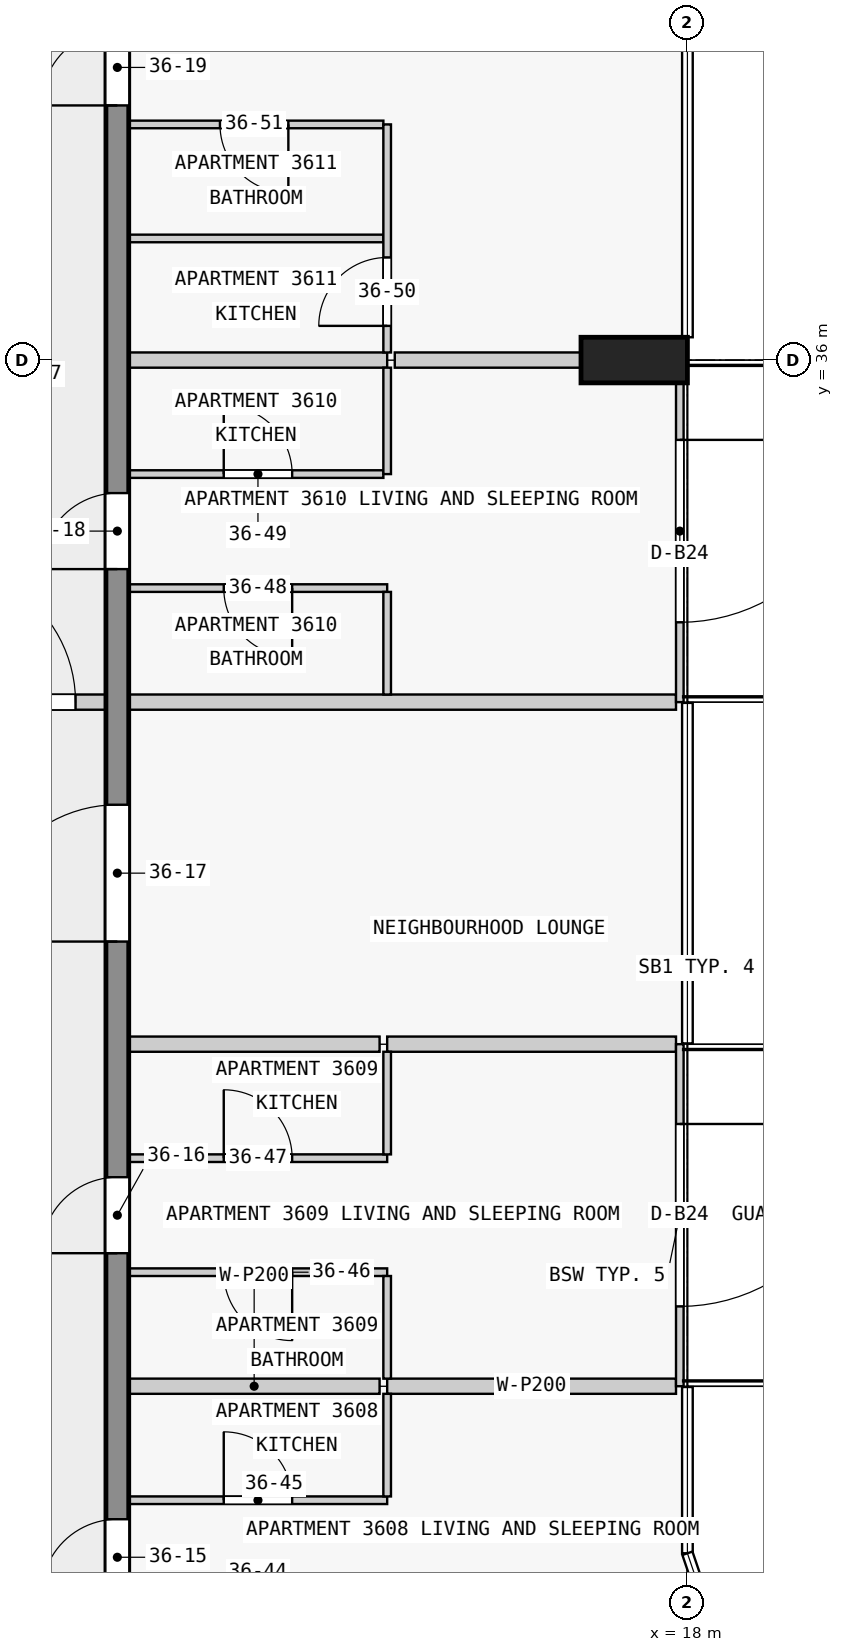
"""IFC4 building model, lengths in metres.
Left out: names, types, materials, properties, quantities, classifications, styles, units other than length and angle.
Written with IfcOpenShell. Run it as: python <this file> out.ifc"""

import sys

from ifc_helpers import new_model, si_unit, direction, frame, frame_2d, origin, origin_2d, place, context, subcontext, project, spatial, rectangle, extrude, element, fill, save


model = new_model("IFC4")
c1 = context("Model", 3, precision=1e-05, world=origin(), true_north=direction((0.0, 1.0)))
c2 = subcontext(c1, "Body", "Model", "MODEL_VIEW")
j1 = project(units=[si_unit("LENGTHUNIT", "METRE"), si_unit("PLANEANGLEUNIT", "RADIAN")], contexts=[c1])
p1 = place(None, origin())
s1 = spatial("IfcSite", under=j1, at=p1, CompositionType="ELEMENT")
p2 = place(p1, origin())
s2 = spatial("IfcBuilding", under=s1, at=p2, CompositionType="ELEMENT")
p3 = place(p2, frame((0.0, 0.0, 142.9)))
s3 = spatial("IfcBuildingStorey", under=s2, at=p3, CompositionType="ELEMENT", Elevation=142.9)
p4 = place(p3, frame((17.3, 36.0, 0.0), z_axis=(0.0, 0.0, 1.0), x_axis=(0.0, 1.0, 0.0)))
e1 = element("IfcColumn", 1, at=p4, inside=s3, PredefinedType="COLUMN", context=c2, shape_type="SweptSolid", body=[
    extrude(rectangle(XDim=0.6, YDim=1.4, at=origin_2d()), origin(), (0.0, 0.0, 1.0), 3.5),
])
p5 = place(p3, frame((10.5, 18.0, 0.0), z_axis=(0.0, 0.0, 1.0), x_axis=(0.0, 1.0, 0.0)))
e2 = element("IfcWall", 2, at=p5, inside=s3, PredefinedType="SHEAR", context=c2, shape_type="SweptSolid", body=[
    extrude(rectangle(XDim=27.0, YDim=0.3, at=frame_2d((13.5, 0.0))), origin(), (0.0, 0.0, 1.0), 3.25),
])
p6 = place(p5, frame((1.75, 0.0, 0.0)))
e3 = element("IfcOpeningElement", 3, at=p6, cuts=e2, PredefinedType="OPENING", context=c2, shape_type="SweptSolid", body=[
    extrude(rectangle(XDim=1.0, YDim=2.1, at=frame_2d((0.5, 1.05))), frame((0.0, 0.16, 0.0), z_axis=(0.0, -1.0, 0.0), x_axis=(1.0, 0.0, 0.0)), (0.0, 0.0, 1.0), 0.32),
])
p7 = place(p5, frame((6.25, 0.0, 0.0)))
e4 = element("IfcOpeningElement", 4, at=p7, cuts=e2, PredefinedType="OPENING", context=c2, shape_type="SweptSolid", body=[
    extrude(rectangle(XDim=1.0, YDim=2.1, at=frame_2d((0.5, 1.05))), frame((0.0, 0.16, 0.0), z_axis=(0.0, -1.0, 0.0), x_axis=(1.0, 0.0, 0.0)), (0.0, 0.0, 1.0), 0.32),
])
p8 = place(p5, frame((10.35, 0.0, 0.0)))
e5 = element("IfcOpeningElement", 5, at=p8, cuts=e2, PredefinedType="OPENING", context=c2, shape_type="SweptSolid", body=[
    extrude(rectangle(XDim=1.8, YDim=2.1, at=frame_2d((0.9, 1.05))), frame((0.0, 0.16, 0.0), z_axis=(0.0, -1.0, 0.0), x_axis=(1.0, 0.0, 0.0)), (0.0, 0.0, 1.0), 0.32),
])
p9 = place(p5, frame((15.25, 0.0, 0.0)))
e6 = element("IfcOpeningElement", 6, at=p9, cuts=e2, PredefinedType="OPENING", context=c2, shape_type="SweptSolid", body=[
    extrude(rectangle(XDim=1.0, YDim=2.1, at=frame_2d((0.5, 1.05))), frame((0.0, 0.16, 0.0), z_axis=(0.0, -1.0, 0.0), x_axis=(1.0, 0.0, 0.0)), (0.0, 0.0, 1.0), 0.32),
])
p10 = place(p5, frame((21.35, 0.0, 0.0)))
e7 = element("IfcOpeningElement", 7, at=p10, cuts=e2, PredefinedType="OPENING", context=c2, shape_type="SweptSolid", body=[
    extrude(rectangle(XDim=1.0, YDim=2.1, at=frame_2d((0.5, 1.05))), frame((0.0, 0.16, 0.0), z_axis=(0.0, -1.0, 0.0), x_axis=(1.0, 0.0, 0.0)), (0.0, 0.0, 1.0), 0.32),
])
p11 = place(p3, frame((17.9, 27.0, 0.0), z_axis=(0.0, 0.0, 1.0), x_axis=(0.0, -1.0, 0.0)))
e8 = element("IfcWall", 8, at=p11, inside=s3, PredefinedType="STANDARD", context=c2, shape_type="SweptSolid", body=[
    extrude(rectangle(XDim=4.5, YDim=0.1, at=frame_2d((2.25, 0.0))), origin(), (0.0, 0.0, 1.0), 3.25),
])
p12 = place(p11, frame((1.05, 0.0, 0.0)))
e9 = element("IfcOpeningElement", 9, at=p12, cuts=e8, PredefinedType="OPENING", context=c2, shape_type="SweptSolid", body=[
    extrude(rectangle(XDim=2.4, YDim=2.4, at=frame_2d((1.2, 1.2))), frame((0.0, 0.06, 0.0), z_axis=(0.0, -1.0, 0.0), x_axis=(1.0, 0.0, 0.0)), (0.0, 0.0, 1.0), 0.12),
])
p13 = place(p3, frame((17.9, 36.0, 0.0), z_axis=(0.0, 0.0, 1.0), x_axis=(0.0, -1.0, 0.0)))
e10 = element("IfcWall", 10, at=p13, inside=s3, PredefinedType="STANDARD", context=c2, shape_type="SweptSolid", body=[
    extrude(rectangle(XDim=4.5, YDim=0.1, at=frame_2d((2.25, 0.0))), origin(), (0.0, 0.0, 1.0), 3.25),
])
p14 = place(p13, frame((1.05, 0.0, 0.0)))
e11 = element("IfcOpeningElement", 11, at=p14, cuts=e10, PredefinedType="OPENING", context=c2, shape_type="SweptSolid", body=[
    extrude(rectangle(XDim=2.4, YDim=2.4, at=frame_2d((1.2, 1.2))), frame((0.0, 0.06, 0.0), z_axis=(0.0, -1.0, 0.0), x_axis=(1.0, 0.0, 0.0)), (0.0, 0.0, 1.0), 0.12),
])
p15 = place(p3, frame((10.65, 21.0, 0.0), z_axis=(0.0, 0.0, 1.0), x_axis=(1.0, 0.0, 0.0)))
e12 = element("IfcWall", 12, at=p15, inside=s3, PredefinedType="PARTITIONING", context=c2, shape_type="SweptSolid", body=[
    extrude(rectangle(XDim=3.4, YDim=0.1, at=frame_2d((1.7, 0.0))), origin(), (0.0, 0.0, 1.0), 3.25),
])
p16 = place(p15, frame((1.25, 0.0, 0.0)))
e13 = element("IfcOpeningElement", 13, at=p16, cuts=e12, PredefinedType="OPENING", context=c2, shape_type="SweptSolid", body=[
    extrude(rectangle(XDim=0.9, YDim=2.1, at=frame_2d((0.45, 1.05))), frame((0.0, 0.06, 0.0), z_axis=(0.0, -1.0, 0.0), x_axis=(1.0, 0.0, 0.0)), (0.0, 0.0, 1.0), 0.12),
])
p17 = place(p3, frame((13.95, 22.5, 0.0), z_axis=(0.0, 0.0, 1.0), x_axis=(-1.0, 0.0, 0.0)))
e14 = element("IfcWall", 14, at=p17, inside=s3, PredefinedType="PARTITIONING", context=c2, shape_type="SweptSolid", body=[
    extrude(rectangle(XDim=3.3, YDim=0.2, at=frame_2d((1.65, 0.0))), origin(), (0.0, 0.0, 1.0), 3.25),
])
p18 = place(p3, frame((14.05, 22.5, 0.0), z_axis=(0.0, 0.0, 1.0), x_axis=(1.0, 0.0, 0.0)))
e15 = element("IfcWall", 15, at=p18, inside=s3, PredefinedType="PARTITIONING", context=c2, shape_type="SweptSolid", body=[
    extrude(rectangle(XDim=3.8, YDim=0.2, at=frame_2d((1.9, 0.0))), origin(), (0.0, 0.0, 1.0), 3.25),
])
p19 = place(p3, frame((14.05, 24.0, 0.0), z_axis=(0.0, 0.0, 1.0), x_axis=(-1.0, 0.0, 0.0)))
e16 = element("IfcWall", 16, at=p19, inside=s3, PredefinedType="PARTITIONING", context=c2, shape_type="SweptSolid", body=[
    extrude(rectangle(XDim=3.4, YDim=0.1, at=frame_2d((1.7, 0.0))), origin(), (0.0, 0.0, 1.0), 3.25),
])
p20 = place(p19, frame((1.25, 0.0, 0.0)))
e17 = element("IfcOpeningElement", 17, at=p20, cuts=e16, PredefinedType="OPENING", context=c2, shape_type="SweptSolid", body=[
    extrude(rectangle(XDim=0.9, YDim=2.1, at=frame_2d((0.45, 1.05))), frame((0.0, 0.06, 0.0), z_axis=(0.0, -1.0, 0.0), x_axis=(1.0, 0.0, 0.0)), (0.0, 0.0, 1.0), 0.12),
])
p21 = place(p3, frame((10.65, 25.5, 0.0), z_axis=(0.0, 0.0, 1.0), x_axis=(1.0, 0.0, 0.0)))
e18 = element("IfcWall", 18, at=p21, inside=s3, PredefinedType="PARTITIONING", context=c2, shape_type="SweptSolid", body=[
    extrude(rectangle(XDim=3.4, YDim=0.1, at=frame_2d((1.7, 0.0))), origin(), (0.0, 0.0, 1.0), 3.25),
])
p22 = place(p21, frame((1.25, 0.0, 0.0)))
e19 = element("IfcOpeningElement", 19, at=p22, cuts=e18, PredefinedType="OPENING", context=c2, shape_type="SweptSolid", body=[
    extrude(rectangle(XDim=0.9, YDim=2.1, at=frame_2d((0.45, 1.05))), frame((0.0, 0.06, 0.0), z_axis=(0.0, -1.0, 0.0), x_axis=(1.0, 0.0, 0.0)), (0.0, 0.0, 1.0), 0.12),
])
p23 = place(p3, frame((13.95, 27.0, 0.0), z_axis=(0.0, 0.0, 1.0), x_axis=(-1.0, 0.0, 0.0)))
e20 = element("IfcWall", 20, at=p23, inside=s3, PredefinedType="PARTITIONING", context=c2, shape_type="SweptSolid", body=[
    extrude(rectangle(XDim=3.3, YDim=0.2, at=frame_2d((1.65, 0.0))), origin(), (0.0, 0.0, 1.0), 3.25),
])
p24 = place(p3, frame((14.05, 27.0, 0.0), z_axis=(0.0, 0.0, 1.0), x_axis=(1.0, 0.0, 0.0)))
e21 = element("IfcWall", 21, at=p24, inside=s3, PredefinedType="PARTITIONING", context=c2, shape_type="SweptSolid", body=[
    extrude(rectangle(XDim=3.8, YDim=0.2, at=frame_2d((1.9, 0.0))), origin(), (0.0, 0.0, 1.0), 3.25),
])
p25 = place(p3, frame((17.85, 31.5, 0.0), z_axis=(0.0, 0.0, 1.0), x_axis=(-1.0, 0.0, 0.0)))
e22 = element("IfcWall", 22, at=p25, inside=s3, PredefinedType="PARTITIONING", context=c2, shape_type="SweptSolid", body=[
    extrude(rectangle(XDim=7.2, YDim=0.2, at=frame_2d((3.6, 0.0))), origin(), (0.0, 0.0, 1.0), 3.25),
])
p26 = place(p3, frame((14.05, 33.0, 0.0), z_axis=(0.0, 0.0, 1.0), x_axis=(-1.0, 0.0, 0.0)))
e23 = element("IfcWall", 23, at=p26, inside=s3, PredefinedType="PARTITIONING", context=c2, shape_type="SweptSolid", body=[
    extrude(rectangle(XDim=3.4, YDim=0.1, at=frame_2d((1.7, 0.0))), origin(), (0.0, 0.0, 1.0), 3.25),
])
p27 = place(p26, frame((1.25, 0.0, 0.0)))
e24 = element("IfcOpeningElement", 24, at=p27, cuts=e23, PredefinedType="OPENING", context=c2, shape_type="SweptSolid", body=[
    extrude(rectangle(XDim=0.9, YDim=2.1, at=frame_2d((0.45, 1.05))), frame((0.0, 0.06, 0.0), z_axis=(0.0, -1.0, 0.0), x_axis=(1.0, 0.0, 0.0)), (0.0, 0.0, 1.0), 0.12),
])
p28 = place(p3, frame((10.65, 34.5, 0.0), z_axis=(0.0, 0.0, 1.0), x_axis=(1.0, 0.0, 0.0)))
e25 = element("IfcWall", 25, at=p28, inside=s3, PredefinedType="PARTITIONING", context=c2, shape_type="SweptSolid", body=[
    extrude(rectangle(XDim=3.35, YDim=0.1, at=frame_2d((1.675, 0.0))), origin(), (0.0, 0.0, 1.0), 3.25),
])
p29 = place(p28, frame((1.25, 0.0, 0.0)))
e26 = element("IfcOpeningElement", 26, at=p29, cuts=e25, PredefinedType="OPENING", context=c2, shape_type="SweptSolid", body=[
    extrude(rectangle(XDim=0.9, YDim=2.1, at=frame_2d((0.45, 1.05))), frame((0.0, 0.06, 0.0), z_axis=(0.0, -1.0, 0.0), x_axis=(1.0, 0.0, 0.0)), (0.0, 0.0, 1.0), 0.12),
])
p30 = place(p3, frame((14.05, 36.0, 0.0), z_axis=(0.0, 0.0, 1.0), x_axis=(-1.0, 0.0, 0.0)))
e27 = element("IfcWall", 27, at=p30, inside=s3, PredefinedType="PARTITIONING", context=c2, shape_type="SweptSolid", body=[
    extrude(rectangle(XDim=3.4, YDim=0.2, at=frame_2d((1.7, 0.0))), origin(), (0.0, 0.0, 1.0), 3.25),
])
p31 = place(p3, frame((14.15, 36.0, 0.0), z_axis=(0.0, 0.0, 1.0), x_axis=(1.0, 0.0, 0.0)))
e28 = element("IfcWall", 28, at=p31, inside=s3, PredefinedType="PARTITIONING", context=c2, shape_type="SweptSolid", body=[
    extrude(rectangle(XDim=2.45, YDim=0.2, at=frame_2d((1.225, 0.0))), origin(), (0.0, 0.0, 1.0), 3.25),
])
p32 = place(p3, frame((14.0, 37.6, 0.0), z_axis=(0.0, 0.0, 1.0), x_axis=(-1.0, 0.0, 0.0)))
e29 = element("IfcWall", 29, at=p32, inside=s3, PredefinedType="PARTITIONING", context=c2, shape_type="SweptSolid", body=[
    extrude(rectangle(XDim=3.35, YDim=0.1, at=frame_2d((1.675, 0.0))), origin(), (0.0, 0.0, 1.0), 3.25),
])
p33 = place(p3, frame((14.0, 39.1, 0.0), z_axis=(0.0, 0.0, 1.0), x_axis=(-1.0, 0.0, 0.0)))
e30 = element("IfcWall", 30, at=p33, inside=s3, PredefinedType="PARTITIONING", context=c2, shape_type="SweptSolid", body=[
    extrude(rectangle(XDim=3.35, YDim=0.1, at=frame_2d((1.675, 0.0))), origin(), (0.0, 0.0, 1.0), 3.25),
])
p34 = place(p33, frame((1.25, 0.0, 0.0)))
e31 = element("IfcOpeningElement", 31, at=p34, cuts=e30, PredefinedType="OPENING", context=c2, shape_type="SweptSolid", body=[
    extrude(rectangle(XDim=0.9, YDim=2.1, at=frame_2d((0.45, 1.05))), frame((0.0, 0.06, 0.0), z_axis=(0.0, -1.0, 0.0), x_axis=(1.0, 0.0, 0.0)), (0.0, 0.0, 1.0), 0.12),
])
for number, where, z_axis, x_axis in (
    (32, (14.05, 21.05, 0.0), (0.0, 0.0, 1.0), (0.0, 1.0, 0.0)),
    (33, (14.05, 22.6, 0.0), (0.0, 0.0, 1.0), (0.0, 1.0, 0.0)),
    (34, (14.05, 25.55, 0.0), (0.0, 0.0, 1.0), (0.0, 1.0, 0.0)),
    (35, (14.05, 31.6, 0.0), (0.0, 0.0, 1.0), (0.0, 1.0, 0.0)),
):
    element("IfcWall", number, at=place(p3, frame(where, z_axis=z_axis, x_axis=x_axis)), inside=s3, PredefinedType="PARTITIONING", context=c2, shape_type="SweptSolid", body=[
        extrude(rectangle(XDim=1.35, YDim=0.1, at=frame_2d((0.675, 0.0))), origin(), (0.0, 0.0, 1.0), 3.25),
    ])
p35 = place(p3, frame((14.05, 34.5, 0.0), z_axis=(0.0, 0.0, 1.0), x_axis=(0.0, 1.0, 0.0)))
e36 = element("IfcWall", 36, at=p35, inside=s3, PredefinedType="PARTITIONING", context=c2, shape_type="SweptSolid", body=[
    extrude(rectangle(XDim=1.4, YDim=0.1, at=frame_2d((0.7, 0.0))), origin(), (0.0, 0.0, 1.0), 3.25),
])
p36 = place(p3, frame((14.05, 36.1, 0.0), z_axis=(0.0, 0.0, 1.0), x_axis=(0.0, 1.0, 0.0)))
e37 = element("IfcWall", 37, at=p36, inside=s3, PredefinedType="PARTITIONING", context=c2, shape_type="SweptSolid", body=[
    extrude(rectangle(XDim=3.0, YDim=0.1, at=frame_2d((1.5, 0.0))), origin(), (0.0, 0.0, 1.0), 3.25),
])
p37 = place(p36, frame((0.35, 0.0, 0.0)))
e38 = element("IfcOpeningElement", 38, at=p37, cuts=e37, PredefinedType="OPENING", context=c2, shape_type="SweptSolid", body=[
    extrude(rectangle(XDim=0.9, YDim=2.1, at=frame_2d((0.45, 1.05))), frame((0.0, 0.06, 0.0), z_axis=(0.0, -1.0, 0.0), x_axis=(1.0, 0.0, 0.0)), (0.0, 0.0, 1.0), 0.12),
])
p38 = place(p3, frame((7.45, 31.5, 0.0), z_axis=(0.0, 0.0, 1.0), x_axis=(1.0, 0.0, 0.0)))
e39 = element("IfcWall", 39, at=p38, inside=s3, PredefinedType="PARTITIONING", context=c2, shape_type="SweptSolid", body=[
    extrude(rectangle(XDim=3.1, YDim=0.2, at=frame_2d((1.55, 0.0))), origin(), (0.0, 0.0, 1.0), 3.25),
])
p39 = place(p38, frame((0.7, 0.0, 0.0)))
e40 = element("IfcOpeningElement", 40, at=p39, cuts=e39, PredefinedType="OPENING", context=c2, shape_type="SweptSolid", body=[
    extrude(rectangle(XDim=1.8, YDim=2.1, at=frame_2d((0.9, 1.05))), frame((0.0, 0.11, 0.0), z_axis=(0.0, -1.0, 0.0), x_axis=(1.0, 0.0, 0.0)), (0.0, 0.0, 1.0), 0.22),
])
p40 = place(p12, origin())
e41 = element("IfcDoor", 41, at=p40, inside=s3, OperationType="SINGLE_SWING_LEFT", PredefinedType="DOOR", context=c2, shape_type="SweptSolid", body=[
    extrude(rectangle(XDim=2.4, YDim=2.4, at=frame_2d((1.2, 1.2))), frame((0.0, 0.025, 0.0), z_axis=(0.0, -1.0, 0.0), x_axis=(1.0, 0.0, 0.0)), (0.0, 0.0, 1.0), 0.05),
])
fill(e9, e41)
p41 = place(p14, origin())
e42 = element("IfcDoor", 42, at=p41, inside=s3, OperationType="SINGLE_SWING_LEFT", PredefinedType="DOOR", context=c2, shape_type="SweptSolid", body=[
    extrude(rectangle(XDim=2.4, YDim=2.4, at=frame_2d((1.2, 1.2))), frame((0.0, 0.025, 0.0), z_axis=(0.0, -1.0, 0.0), x_axis=(1.0, 0.0, 0.0)), (0.0, 0.0, 1.0), 0.05),
])
fill(e11, e42)
p42 = place(p6, origin())
e43 = element("IfcDoor", 43, at=p42, inside=s3, OperationType="SINGLE_SWING_LEFT", PredefinedType="DOOR", context=c2, shape_type="SweptSolid", body=[
    extrude(rectangle(XDim=1.0, YDim=2.1, at=frame_2d((0.5, 1.05))), frame((0.0, 0.025, 0.0), z_axis=(0.0, -1.0, 0.0), x_axis=(1.0, 0.0, 0.0)), (0.0, 0.0, 1.0), 0.05),
])
fill(e3, e43)
p43 = place(p7, origin())
e44 = element("IfcDoor", 44, at=p43, inside=s3, OperationType="SINGLE_SWING_LEFT", PredefinedType="DOOR", context=c2, shape_type="SweptSolid", body=[
    extrude(rectangle(XDim=1.0, YDim=2.1, at=frame_2d((0.5, 1.05))), frame((0.0, 0.025, 0.0), z_axis=(0.0, -1.0, 0.0), x_axis=(1.0, 0.0, 0.0)), (0.0, 0.0, 1.0), 0.05),
])
fill(e4, e44)
p44 = place(p8, origin())
e45 = element("IfcDoor", 45, at=p44, inside=s3, OperationType="SINGLE_SWING_LEFT", PredefinedType="DOOR", context=c2, shape_type="SweptSolid", body=[
    extrude(rectangle(XDim=1.8, YDim=2.1, at=frame_2d((0.9, 1.05))), frame((0.0, 0.025, 0.0), z_axis=(0.0, -1.0, 0.0), x_axis=(1.0, 0.0, 0.0)), (0.0, 0.0, 1.0), 0.05),
])
fill(e5, e45)
p45 = place(p9, origin())
e46 = element("IfcDoor", 46, at=p45, inside=s3, OperationType="SINGLE_SWING_RIGHT", PredefinedType="DOOR", context=c2, shape_type="SweptSolid", body=[
    extrude(rectangle(XDim=1.0, YDim=2.1, at=frame_2d((0.5, 1.05))), frame((0.0, 0.025, 0.0), z_axis=(0.0, -1.0, 0.0), x_axis=(1.0, 0.0, 0.0)), (0.0, 0.0, 1.0), 0.05),
])
fill(e6, e46)
p46 = place(p10, origin())
e47 = element("IfcDoor", 47, at=p46, inside=s3, OperationType="SINGLE_SWING_RIGHT", PredefinedType="DOOR", context=c2, shape_type="SweptSolid", body=[
    extrude(rectangle(XDim=1.0, YDim=2.1, at=frame_2d((0.5, 1.05))), frame((0.0, 0.025, 0.0), z_axis=(0.0, -1.0, 0.0), x_axis=(1.0, 0.0, 0.0)), (0.0, 0.0, 1.0), 0.05),
])
fill(e7, e47)
p47 = place(p39, origin())
e48 = element("IfcDoor", 48, at=p47, inside=s3, OperationType="SINGLE_SWING_RIGHT", PredefinedType="DOOR", context=c2, shape_type="SweptSolid", body=[
    extrude(rectangle(XDim=1.8, YDim=2.1, at=frame_2d((0.9, 1.05))), frame((0.0, 0.025, 0.0), z_axis=(0.0, -1.0, 0.0), x_axis=(1.0, 0.0, 0.0)), (0.0, 0.0, 1.0), 0.05),
])
fill(e40, e48)
p48 = place(p16, origin())
e49 = element("IfcDoor", 49, at=p48, inside=s3, OperationType="SINGLE_SWING_LEFT", PredefinedType="DOOR", context=c2, shape_type="SweptSolid", body=[
    extrude(rectangle(XDim=0.9, YDim=2.1, at=frame_2d((0.45, 1.05))), frame((0.0, 0.025, 0.0), z_axis=(0.0, -1.0, 0.0), x_axis=(1.0, 0.0, 0.0)), (0.0, 0.0, 1.0), 0.05),
])
fill(e13, e49)
p49 = place(p20, origin())
e50 = element("IfcDoor", 50, at=p49, inside=s3, OperationType="SINGLE_SWING_LEFT", PredefinedType="DOOR", context=c2, shape_type="SweptSolid", body=[
    extrude(rectangle(XDim=0.9, YDim=2.1, at=frame_2d((0.45, 1.05))), frame((0.0, 0.025, 0.0), z_axis=(0.0, -1.0, 0.0), x_axis=(1.0, 0.0, 0.0)), (0.0, 0.0, 1.0), 0.05),
])
fill(e17, e50)
p50 = place(p22, origin())
e51 = element("IfcDoor", 51, at=p50, inside=s3, OperationType="SINGLE_SWING_LEFT", PredefinedType="DOOR", context=c2, shape_type="SweptSolid", body=[
    extrude(rectangle(XDim=0.9, YDim=2.1, at=frame_2d((0.45, 1.05))), frame((0.0, 0.025, 0.0), z_axis=(0.0, -1.0, 0.0), x_axis=(1.0, 0.0, 0.0)), (0.0, 0.0, 1.0), 0.05),
])
fill(e19, e51)
p51 = place(p27, origin())
e52 = element("IfcDoor", 52, at=p51, inside=s3, OperationType="SINGLE_SWING_LEFT", PredefinedType="DOOR", context=c2, shape_type="SweptSolid", body=[
    extrude(rectangle(XDim=0.9, YDim=2.1, at=frame_2d((0.45, 1.05))), frame((0.0, 0.025, 0.0), z_axis=(0.0, -1.0, 0.0), x_axis=(1.0, 0.0, 0.0)), (0.0, 0.0, 1.0), 0.05),
])
fill(e24, e52)
p52 = place(p29, origin())
e53 = element("IfcDoor", 53, at=p52, inside=s3, OperationType="SINGLE_SWING_RIGHT", PredefinedType="DOOR", context=c2, shape_type="SweptSolid", body=[
    extrude(rectangle(XDim=0.9, YDim=2.1, at=frame_2d((0.45, 1.05))), frame((0.0, 0.025, 0.0), z_axis=(0.0, -1.0, 0.0), x_axis=(1.0, 0.0, 0.0)), (0.0, 0.0, 1.0), 0.05),
])
fill(e26, e53)
p53 = place(p37, origin())
e54 = element("IfcDoor", 54, at=p53, inside=s3, OperationType="SINGLE_SWING_LEFT", PredefinedType="DOOR", context=c2, shape_type="SweptSolid", body=[
    extrude(rectangle(XDim=0.9, YDim=2.1, at=frame_2d((0.45, 1.05))), frame((0.0, 0.025, 0.0), z_axis=(0.0, -1.0, 0.0), x_axis=(1.0, 0.0, 0.0)), (0.0, 0.0, 1.0), 0.05),
])
fill(e38, e54)
p54 = place(p34, origin())
e55 = element("IfcDoor", 55, at=p54, inside=s3, OperationType="SINGLE_SWING_RIGHT", PredefinedType="DOOR", context=c2, shape_type="SweptSolid", body=[
    extrude(rectangle(XDim=0.9, YDim=2.1, at=frame_2d((0.45, 1.05))), frame((0.0, 0.025, 0.0), z_axis=(0.0, -1.0, 0.0), x_axis=(1.0, 0.0, 0.0)), (0.0, 0.0, 1.0), 0.05),
])
fill(e31, e55)
save(model, sys.argv[1])
